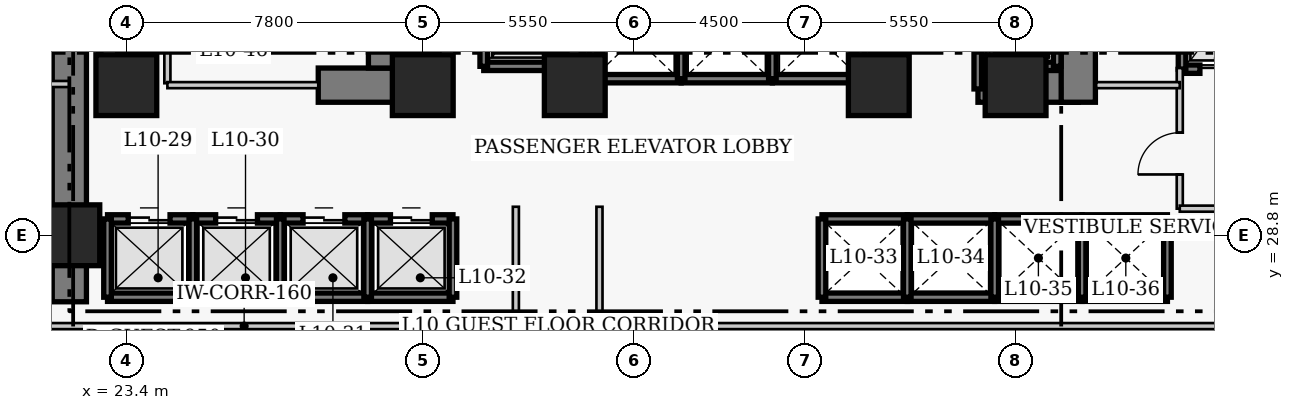
"""IFC4 building model, lengths in metres.
Left out: names, types, materials, properties, quantities, classifications, styles, units other than length and angle.
Written with IfcOpenShell. Run it as: python <this file> out.ifc"""

import sys

from ifc_helpers import new_model, si_unit, direction, frame, frame_2d, origin, origin_2d, place, context, subcontext, project, spatial, rectangle, extrude, element, fill, save


model = new_model("IFC4")
c1 = context("Model", 3, precision=1e-05, world=origin(), true_north=direction((0.0, 1.0)))
c2 = subcontext(c1, "Body", "Model", "MODEL_VIEW")
j1 = project(units=[si_unit("LENGTHUNIT", "METRE"), si_unit("PLANEANGLEUNIT", "RADIAN")], contexts=[c1])
p1 = place(None, origin())
s1 = spatial("IfcSite", under=j1, at=p1, CompositionType="ELEMENT")
p2 = place(p1, origin())
s2 = spatial("IfcBuilding", under=s1, at=p2, CompositionType="ELEMENT")
p3 = place(p2, frame((0.0, 0.0, 45.0)))
s3 = spatial("IfcBuildingStorey", under=s2, at=p3, CompositionType="ELEMENT", Elevation=45.0)
p4 = place(p3, frame((21.9, 27.05, 0.0), z_axis=(0.0, 0.0, 1.0), x_axis=(0.0, 1.0, 0.0)))
e1 = element("IfcWall", 1, at=p4, inside=s3, PredefinedType="SHEAR", context=c2, shape_type="SweptSolid", body=[
    extrude(rectangle(XDim=13.72, YDim=0.9, at=frame_2d((6.86, 0.0))), origin(), (0.0, 0.0, 1.0), 3.8),
])
p5 = place(p3, frame((28.45, 32.75, 0.0), z_axis=(0.0, 0.0, 1.0), x_axis=(1.0, 0.0, 0.0)))
e2 = element("IfcWall", 2, at=p5, inside=s3, PredefinedType="SHEAR", context=c2, shape_type="SweptSolid", body=[
    extrude(rectangle(XDim=2.4, YDim=0.9, at=frame_2d((1.2, 0.0))), origin(), (0.0, 0.0, 1.0), 3.8),
])
p6 = place(p3, frame((45.81, 32.75, 0.0), z_axis=(0.0, 0.0, 1.0), x_axis=(1.0, 0.0, 0.0)))
e3 = element("IfcWall", 3, at=p6, inside=s3, PredefinedType="SHEAR", context=c2, shape_type="SweptSolid", body=[
    extrude(rectangle(XDim=2.64, YDim=0.9, at=frame_2d((1.32, 0.0))), origin(), (0.0, 0.0, 1.0), 3.8),
])
p7 = place(p3, frame((30.22, 33.2, 0.0), z_axis=(0.0, 0.0, 1.0), x_axis=(0.0, 1.0, 0.0)))
e4 = element("IfcWall", 4, at=p7, inside=s3, PredefinedType="SHEAR", context=c2, shape_type="SweptSolid", body=[
    extrude(rectangle(XDim=7.12, YDim=0.9, at=frame_2d((3.56, 0.0))), origin(), (0.0, 0.0, 1.0), 3.8),
])
p8 = place(p3, frame((48.45, 32.3, 0.0), z_axis=(0.0, 0.0, 1.0), x_axis=(0.0, 1.0, 0.0)))
e5 = element("IfcWall", 5, at=p8, inside=s3, PredefinedType="SHEAR", context=c2, shape_type="SweptSolid", body=[
    extrude(rectangle(XDim=8.02, YDim=0.9, at=frame_2d((4.01, 0.0))), origin(), (0.0, 0.0, 1.0), 3.8),
])
p9 = place(p8, frame((5.9, 0.0, 0.0)))
e6 = element("IfcOpeningElement", 6, at=p9, cuts=e5, PredefinedType="OPENING", context=c2, shape_type="SweptSolid", body=[
    extrude(rectangle(XDim=1.1, YDim=2.15, at=frame_2d((0.55, 1.075))), frame((0.0, 0.46, 0.0), z_axis=(0.0, -1.0, 0.0), x_axis=(1.0, 0.0, 0.0)), (0.0, 0.0, 1.0), 0.92),
])
for number, where, z_axis, x_axis in (
    (7, (21.9, 28.8, 0.0), (0.0, 0.0, 1.0), (1.0, 0.0, 0.0)),
    (8, (23.4, 32.75, 0.0), (0.0, 0.0, 1.0), (1.0, 0.0, 0.0)),
    (9, (31.2, 32.75, 0.0), (0.0, 0.0, 1.0), (1.0, 0.0, 0.0)),
    (10, (35.2, 32.75, 0.0), (0.0, 0.0, 1.0), (1.0, 0.0, 0.0)),
    (11, (43.2, 32.75, 0.0), (0.0, 0.0, 1.0), (1.0, 0.0, 0.0)),
    (12, (46.8, 32.75, 0.0), (0.0, 0.0, 1.0), (1.0, 0.0, 0.0)),
):
    element("IfcColumn", number, at=place(p3, frame(where, z_axis=z_axis, x_axis=x_axis)), inside=s3, PredefinedType="COLUMN", context=c2, shape_type="SweptSolid", body=[
        extrude(rectangle(XDim=1.6, YDim=1.6, at=origin_2d()), origin(), (0.0, 0.0, 1.0), 3.8),
    ])
p10 = place(p3, frame((22.905, 29.23, 0.0), z_axis=(0.0, 0.0, 1.0), x_axis=(1.0, 0.0, 0.0)))
e13 = element("IfcWall", 13, at=p10, inside=s3, PredefinedType="SHEAR", context=c2, shape_type="SweptSolid", body=[
    extrude(rectangle(XDim=2.245, YDim=0.22, at=frame_2d((1.123, 0.0))), origin(), (0.0, 0.0, 1.0), 3.8),
])
p11 = place(p10, frame((0.545, 0.0, 0.0)))
e14 = element("IfcOpeningElement", 14, at=p11, cuts=e13, PredefinedType="OPENING", context=c2, shape_type="SweptSolid", body=[
    extrude(rectangle(XDim=1.1, YDim=2.15, at=frame_2d((0.55, 1.075))), frame((0.0, 0.12, 0.0), z_axis=(0.0, -1.0, 0.0), x_axis=(1.0, 0.0, 0.0)), (0.0, 0.0, 1.0), 0.24),
])
p12 = place(p3, frame((22.905, 27.17, 0.0), z_axis=(0.0, 0.0, 1.0), x_axis=(1.0, 0.0, 0.0)))
e15 = element("IfcWall", 15, at=p12, inside=s3, PredefinedType="SHEAR", context=c2, shape_type="SweptSolid", body=[
    extrude(rectangle(XDim=2.245, YDim=0.22, at=frame_2d((1.123, 0.0))), origin(), (0.0, 0.0, 1.0), 3.8),
])
p13 = place(p3, frame((22.905, 27.17, 0.0), z_axis=(0.0, 0.0, 1.0), x_axis=(0.0, 1.0, 0.0)))
e16 = element("IfcWall", 16, at=p13, inside=s3, PredefinedType="SHEAR", context=c2, shape_type="SweptSolid", body=[
    extrude(rectangle(XDim=2.06, YDim=0.2, at=frame_2d((1.03, 0.0))), origin(), (0.0, 0.0, 1.0), 3.8),
])
p14 = place(p3, frame((25.15, 29.23, 0.0), z_axis=(0.0, 0.0, 1.0), x_axis=(1.0, 0.0, 0.0)))
e17 = element("IfcWall", 17, at=p14, inside=s3, PredefinedType="SHEAR", context=c2, shape_type="SweptSolid", body=[
    extrude(rectangle(XDim=2.3, YDim=0.22, at=frame_2d((1.15, 0.0))), origin(), (0.0, 0.0, 1.0), 3.8),
])
p15 = place(p14, frame((0.6, 0.0, 0.0)))
e18 = element("IfcOpeningElement", 18, at=p15, cuts=e17, PredefinedType="OPENING", context=c2, shape_type="SweptSolid", body=[
    extrude(rectangle(XDim=1.1, YDim=2.15, at=frame_2d((0.55, 1.075))), frame((0.0, 0.12, 0.0), z_axis=(0.0, -1.0, 0.0), x_axis=(1.0, 0.0, 0.0)), (0.0, 0.0, 1.0), 0.24),
])
p16 = place(p3, frame((25.15, 27.17, 0.0), z_axis=(0.0, 0.0, 1.0), x_axis=(1.0, 0.0, 0.0)))
e19 = element("IfcWall", 19, at=p16, inside=s3, PredefinedType="SHEAR", context=c2, shape_type="SweptSolid", body=[
    extrude(rectangle(XDim=2.3, YDim=0.22, at=frame_2d((1.15, 0.0))), origin(), (0.0, 0.0, 1.0), 3.8),
])
p17 = place(p3, frame((25.15, 27.17, 0.0), z_axis=(0.0, 0.0, 1.0), x_axis=(0.0, 1.0, 0.0)))
e20 = element("IfcWall", 20, at=p17, inside=s3, PredefinedType="SHEAR", context=c2, shape_type="SweptSolid", body=[
    extrude(rectangle(XDim=2.06, YDim=0.2, at=frame_2d((1.03, 0.0))), origin(), (0.0, 0.0, 1.0), 3.8),
])
p18 = place(p3, frame((27.45, 29.23, 0.0), z_axis=(0.0, 0.0, 1.0), x_axis=(1.0, 0.0, 0.0)))
e21 = element("IfcWall", 21, at=p18, inside=s3, PredefinedType="SHEAR", context=c2, shape_type="SweptSolid", body=[
    extrude(rectangle(XDim=2.3, YDim=0.22, at=frame_2d((1.15, 0.0))), origin(), (0.0, 0.0, 1.0), 3.8),
])
p19 = place(p18, frame((0.6, 0.0, 0.0)))
e22 = element("IfcOpeningElement", 22, at=p19, cuts=e21, PredefinedType="OPENING", context=c2, shape_type="SweptSolid", body=[
    extrude(rectangle(XDim=1.1, YDim=2.15, at=frame_2d((0.55, 1.075))), frame((0.0, 0.12, 0.0), z_axis=(0.0, -1.0, 0.0), x_axis=(1.0, 0.0, 0.0)), (0.0, 0.0, 1.0), 0.24),
])
p20 = place(p3, frame((27.45, 27.17, 0.0), z_axis=(0.0, 0.0, 1.0), x_axis=(1.0, 0.0, 0.0)))
e23 = element("IfcWall", 23, at=p20, inside=s3, PredefinedType="SHEAR", context=c2, shape_type="SweptSolid", body=[
    extrude(rectangle(XDim=2.3, YDim=0.22, at=frame_2d((1.15, 0.0))), origin(), (0.0, 0.0, 1.0), 3.8),
])
p21 = place(p3, frame((27.45, 27.17, 0.0), z_axis=(0.0, 0.0, 1.0), x_axis=(0.0, 1.0, 0.0)))
e24 = element("IfcWall", 24, at=p21, inside=s3, PredefinedType="SHEAR", context=c2, shape_type="SweptSolid", body=[
    extrude(rectangle(XDim=2.06, YDim=0.2, at=frame_2d((1.03, 0.0))), origin(), (0.0, 0.0, 1.0), 3.8),
])
p22 = place(p3, frame((29.75, 29.23, 0.0), z_axis=(0.0, 0.0, 1.0), x_axis=(1.0, 0.0, 0.0)))
e25 = element("IfcWall", 25, at=p22, inside=s3, PredefinedType="SHEAR", context=c2, shape_type="SweptSolid", body=[
    extrude(rectangle(XDim=2.245, YDim=0.22, at=frame_2d((1.123, 0.0))), origin(), (0.0, 0.0, 1.0), 3.8),
])
p23 = place(p22, frame((0.6, 0.0, 0.0)))
e26 = element("IfcOpeningElement", 26, at=p23, cuts=e25, PredefinedType="OPENING", context=c2, shape_type="SweptSolid", body=[
    extrude(rectangle(XDim=1.1, YDim=2.15, at=frame_2d((0.55, 1.075))), frame((0.0, 0.12, 0.0), z_axis=(0.0, -1.0, 0.0), x_axis=(1.0, 0.0, 0.0)), (0.0, 0.0, 1.0), 0.24),
])
p24 = place(p3, frame((29.75, 27.17, 0.0), z_axis=(0.0, 0.0, 1.0), x_axis=(1.0, 0.0, 0.0)))
e27 = element("IfcWall", 27, at=p24, inside=s3, PredefinedType="SHEAR", context=c2, shape_type="SweptSolid", body=[
    extrude(rectangle(XDim=2.245, YDim=0.22, at=frame_2d((1.123, 0.0))), origin(), (0.0, 0.0, 1.0), 3.8),
])
for number, where, z_axis, x_axis in (
    (28, (29.75, 27.17, 0.0), (0.0, 0.0, 1.0), (0.0, 1.0, 0.0)),
    (29, (31.995, 27.17, 0.0), (0.0, 0.0, 1.0), (0.0, 1.0, 0.0)),
):
    element("IfcWall", number, at=place(p3, frame(where, z_axis=z_axis, x_axis=x_axis)), inside=s3, PredefinedType="SHEAR", context=c2, shape_type="SweptSolid", body=[
        extrude(rectangle(XDim=2.06, YDim=0.2, at=frame_2d((1.03, 0.0))), origin(), (0.0, 0.0, 1.0), 3.8),
    ])
for number, where, z_axis, x_axis in (
    (30, (41.705, 29.23, 0.0), (0.0, 0.0, 1.0), (1.0, 0.0, 0.0)),
    (31, (41.705, 27.17, 0.0), (0.0, 0.0, 1.0), (1.0, 0.0, 0.0)),
):
    element("IfcWall", number, at=place(p3, frame(where, z_axis=z_axis, x_axis=x_axis)), inside=s3, PredefinedType="SHEAR", context=c2, shape_type="SweptSolid", body=[
        extrude(rectangle(XDim=2.245, YDim=0.22, at=frame_2d((1.123, 0.0))), origin(), (0.0, 0.0, 1.0), 3.8),
    ])
p25 = place(p3, frame((41.705, 27.17, 0.0), z_axis=(0.0, 0.0, 1.0), x_axis=(0.0, 1.0, 0.0)))
e32 = element("IfcWall", 32, at=p25, inside=s3, PredefinedType="SHEAR", context=c2, shape_type="SweptSolid", body=[
    extrude(rectangle(XDim=2.06, YDim=0.2, at=frame_2d((1.03, 0.0))), origin(), (0.0, 0.0, 1.0), 3.8),
])
for number, where, z_axis, x_axis in (
    (33, (43.95, 29.23, 0.0), (0.0, 0.0, 1.0), (1.0, 0.0, 0.0)),
    (34, (43.95, 27.17, 0.0), (0.0, 0.0, 1.0), (1.0, 0.0, 0.0)),
):
    element("IfcWall", number, at=place(p3, frame(where, z_axis=z_axis, x_axis=x_axis)), inside=s3, PredefinedType="SHEAR", context=c2, shape_type="SweptSolid", body=[
        extrude(rectangle(XDim=2.3, YDim=0.22, at=frame_2d((1.15, 0.0))), origin(), (0.0, 0.0, 1.0), 3.8),
    ])
p26 = place(p3, frame((43.95, 27.17, 0.0), z_axis=(0.0, 0.0, 1.0), x_axis=(0.0, 1.0, 0.0)))
e35 = element("IfcWall", 35, at=p26, inside=s3, PredefinedType="SHEAR", context=c2, shape_type="SweptSolid", body=[
    extrude(rectangle(XDim=2.06, YDim=0.2, at=frame_2d((1.03, 0.0))), origin(), (0.0, 0.0, 1.0), 3.8),
])
for number, where, z_axis, x_axis in (
    (36, (46.25, 29.23, 0.0), (0.0, 0.0, 1.0), (1.0, 0.0, 0.0)),
    (37, (46.25, 27.17, 0.0), (0.0, 0.0, 1.0), (1.0, 0.0, 0.0)),
):
    element("IfcWall", number, at=place(p3, frame(where, z_axis=z_axis, x_axis=x_axis)), inside=s3, PredefinedType="SHEAR", context=c2, shape_type="SweptSolid", body=[
        extrude(rectangle(XDim=2.3, YDim=0.22, at=frame_2d((1.15, 0.0))), origin(), (0.0, 0.0, 1.0), 3.8),
    ])
p27 = place(p3, frame((46.25, 27.17, 0.0), z_axis=(0.0, 0.0, 1.0), x_axis=(0.0, 1.0, 0.0)))
e38 = element("IfcWall", 38, at=p27, inside=s3, PredefinedType="SHEAR", context=c2, shape_type="SweptSolid", body=[
    extrude(rectangle(XDim=2.06, YDim=0.2, at=frame_2d((1.03, 0.0))), origin(), (0.0, 0.0, 1.0), 3.8),
])
for number, where, z_axis, x_axis in (
    (39, (48.55, 29.23, 0.0), (0.0, 0.0, 1.0), (1.0, 0.0, 0.0)),
    (40, (48.55, 27.17, 0.0), (0.0, 0.0, 1.0), (1.0, 0.0, 0.0)),
):
    element("IfcWall", number, at=place(p3, frame(where, z_axis=z_axis, x_axis=x_axis)), inside=s3, PredefinedType="SHEAR", context=c2, shape_type="SweptSolid", body=[
        extrude(rectangle(XDim=2.245, YDim=0.22, at=frame_2d((1.123, 0.0))), origin(), (0.0, 0.0, 1.0), 3.8),
    ])
for number, where, z_axis, x_axis in (
    (41, (48.55, 27.17, 0.0), (0.0, 0.0, 1.0), (0.0, 1.0, 0.0)),
    (42, (50.795, 27.17, 0.0), (0.0, 0.0, 1.0), (0.0, 1.0, 0.0)),
):
    element("IfcWall", number, at=place(p3, frame(where, z_axis=z_axis, x_axis=x_axis)), inside=s3, PredefinedType="SHEAR", context=c2, shape_type="SweptSolid", body=[
        extrude(rectangle(XDim=2.06, YDim=0.2, at=frame_2d((1.03, 0.0))), origin(), (0.0, 0.0, 1.0), 3.8),
    ])
p28 = place(p3, frame((35.68, 32.92, 0.0), z_axis=(0.0, 0.0, 1.0), x_axis=(1.0, 0.0, 0.0)))
e43 = element("IfcWall", 43, at=p28, inside=s3, PredefinedType="SHEAR", context=c2, shape_type="SweptSolid", body=[
    extrude(rectangle(XDim=2.32, YDim=0.22, at=frame_2d((1.16, 0.0))), origin(), (0.0, 0.0, 1.0), 3.8),
])
p29 = place(p3, frame((35.68, 32.92, 0.0), z_axis=(0.0, 0.0, 1.0), x_axis=(0.0, 1.0, 0.0)))
e44 = element("IfcWall", 44, at=p29, inside=s3, PredefinedType="SHEAR", context=c2, shape_type="SweptSolid", body=[
    extrude(rectangle(XDim=2.16, YDim=0.2, at=frame_2d((1.08, 0.0))), origin(), (0.0, 0.0, 1.0), 3.8),
])
p30 = place(p3, frame((38.0, 32.92, 0.0), z_axis=(0.0, 0.0, 1.0), x_axis=(1.0, 0.0, 0.0)))
e45 = element("IfcWall", 45, at=p30, inside=s3, PredefinedType="SHEAR", context=c2, shape_type="SweptSolid", body=[
    extrude(rectangle(XDim=2.4, YDim=0.22, at=frame_2d((1.2, 0.0))), origin(), (0.0, 0.0, 1.0), 3.8),
])
p31 = place(p3, frame((38.0, 32.92, 0.0), z_axis=(0.0, 0.0, 1.0), x_axis=(0.0, 1.0, 0.0)))
e46 = element("IfcWall", 46, at=p31, inside=s3, PredefinedType="SHEAR", context=c2, shape_type="SweptSolid", body=[
    extrude(rectangle(XDim=2.16, YDim=0.2, at=frame_2d((1.08, 0.0))), origin(), (0.0, 0.0, 1.0), 3.8),
])
p32 = place(p3, frame((40.4, 32.92, 0.0), z_axis=(0.0, 0.0, 1.0), x_axis=(1.0, 0.0, 0.0)))
e47 = element("IfcWall", 47, at=p32, inside=s3, PredefinedType="SHEAR", context=c2, shape_type="SweptSolid", body=[
    extrude(rectangle(XDim=2.32, YDim=0.22, at=frame_2d((1.16, 0.0))), origin(), (0.0, 0.0, 1.0), 3.8),
])
for number, where, z_axis, x_axis in (
    (48, (40.4, 32.92, 0.0), (0.0, 0.0, 1.0), (0.0, 1.0, 0.0)),
    (49, (42.72, 32.92, 0.0), (0.0, 0.0, 1.0), (0.0, 1.0, 0.0)),
):
    element("IfcWall", number, at=place(p3, frame(where, z_axis=z_axis, x_axis=x_axis)), inside=s3, PredefinedType="SHEAR", context=c2, shape_type="SweptSolid", body=[
        extrude(rectangle(XDim=2.16, YDim=0.2, at=frame_2d((1.08, 0.0))), origin(), (0.0, 0.0, 1.0), 3.8),
    ])
p33 = place(p3, frame((51.18, 33.17, 0.0), z_axis=(0.0, 0.0, 1.0), x_axis=(1.0, 0.0, 0.0)))
e50 = element("IfcWall", 50, at=p33, inside=s3, PredefinedType="SHEAR", context=c2, shape_type="SweptSolid", body=[
    extrude(rectangle(XDim=2.42, YDim=0.22, at=frame_2d((1.21, 0.0))), origin(), (0.0, 0.0, 1.0), 3.8),
])
p34 = place(p33, frame((0.47, 0.0, 0.0)))
e51 = element("IfcOpeningElement", 51, at=p34, cuts=e50, PredefinedType="OPENING", context=c2, shape_type="SweptSolid", body=[
    extrude(rectangle(XDim=1.3, YDim=2.15, at=frame_2d((0.65, 1.075))), frame((0.0, 0.12, 0.0), z_axis=(0.0, -1.0, 0.0), x_axis=(1.0, 0.0, 0.0)), (0.0, 0.0, 1.0), 0.24),
])
p35 = place(p3, frame((51.18, 33.17, 0.0), z_axis=(0.0, 0.0, 1.0), x_axis=(0.0, 1.0, 0.0)))
e52 = element("IfcWall", 52, at=p35, inside=s3, PredefinedType="SHEAR", context=c2, shape_type="SweptSolid", body=[
    extrude(rectangle(XDim=2.86, YDim=0.2, at=frame_2d((1.43, 0.0))), origin(), (0.0, 0.0, 1.0), 3.8),
])
p36 = place(p3, frame((32.805, 33.245, 0.0), z_axis=(0.0, 0.0, 1.0), x_axis=(1.0, 0.0, 0.0)))
e53 = element("IfcWall", 53, at=p36, inside=s3, PredefinedType="SHEAR", context=c2, shape_type="SweptSolid", body=[
    extrude(rectangle(XDim=2.09, YDim=0.22, at=frame_2d((1.045, 0.0))), origin(), (0.0, 0.0, 1.0), 3.8),
])
for number, where, z_axis, x_axis in (
    (54, (32.805, 33.245, 0.0), (0.0, 0.0, 1.0), (0.0, 1.0, 0.0)),
    (55, (34.895, 33.245, 0.0), (0.0, 0.0, 1.0), (0.0, 1.0, 0.0)),
):
    element("IfcWall", number, at=place(p3, frame(where, z_axis=z_axis, x_axis=x_axis)), inside=s3, PredefinedType="SHEAR", context=c2, shape_type="SweptSolid", body=[
        extrude(rectangle(XDim=2.91, YDim=0.2, at=frame_2d((1.455, 0.0))), origin(), (0.0, 0.0, 1.0), 3.8),
    ])
p37 = place(p3, frame((45.805, 33.245, 0.0), z_axis=(0.0, 0.0, 1.0), x_axis=(1.0, 0.0, 0.0)))
e56 = element("IfcWall", 56, at=p37, inside=s3, PredefinedType="SHEAR", context=c2, shape_type="SweptSolid", body=[
    extrude(rectangle(XDim=2.09, YDim=0.22, at=frame_2d((1.045, 0.0))), origin(), (0.0, 0.0, 1.0), 3.8),
])
p38 = place(p3, frame((45.805, 32.65, 0.0), z_axis=(0.0, 0.0, 1.0), x_axis=(0.0, 1.0, 0.0)))
e57 = element("IfcWall", 57, at=p38, inside=s3, PredefinedType="SHEAR", context=c2, shape_type="SweptSolid", body=[
    extrude(rectangle(XDim=3.505, YDim=0.2, at=frame_2d((1.752, 0.0))), origin(), (0.0, 0.0, 1.0), 3.8),
])
p39 = place(p3, frame((47.895, 33.245, 0.0), z_axis=(0.0, 0.0, 1.0), x_axis=(0.0, 1.0, 0.0)))
e58 = element("IfcWall", 58, at=p39, inside=s3, PredefinedType="SHEAR", context=c2, shape_type="SweptSolid", body=[
    extrude(rectangle(XDim=2.91, YDim=0.2, at=frame_2d((1.455, 0.0))), origin(), (0.0, 0.0, 1.0), 3.8),
])
p40 = place(p3, frame((24.48, 32.8, 0.0), z_axis=(0.0, 0.0, 1.0), x_axis=(0.0, 1.0, 0.0)))
e59 = element("IfcWall", 59, at=p40, inside=s3, PredefinedType="PARTITIONING", context=c2, shape_type="SweptSolid", body=[
    extrude(rectangle(XDim=3.57, YDim=0.16, at=frame_2d((1.785, 0.0))), origin(), (0.0, 0.0, 1.0), 3.54),
])
p41 = place(p40, frame((1.604, 0.0, 0.0)))
e60 = element("IfcOpeningElement", 60, at=p41, cuts=e59, PredefinedType="OPENING", context=c2, shape_type="SweptSolid", body=[
    extrude(rectangle(XDim=0.9, YDim=2.1, at=frame_2d((0.45, 1.05))), frame((0.0, 0.09, 0.0), z_axis=(0.0, -1.0, 0.0), x_axis=(1.0, 0.0, 0.0)), (0.0, 0.0, 1.0), 0.18),
])
p42 = place(p3, frame((51.12, 29.5, 0.0), z_axis=(0.0, 0.0, 1.0), x_axis=(0.0, 1.0, 0.0)))
e61 = element("IfcWall", 61, at=p42, inside=s3, PredefinedType="PARTITIONING", context=c2, shape_type="SweptSolid", body=[
    extrude(rectangle(XDim=3.7, YDim=0.16, at=frame_2d((1.85, 0.0))), origin(), (0.0, 0.0, 1.0), 3.54),
])
p43 = place(p42, frame((0.9, 0.0, 0.0)))
e62 = element("IfcOpeningElement", 62, at=p43, cuts=e61, PredefinedType="OPENING", context=c2, shape_type="SweptSolid", body=[
    extrude(rectangle(XDim=1.1, YDim=2.15, at=frame_2d((0.55, 1.075))), frame((0.0, 0.09, 0.0), z_axis=(0.0, -1.0, 0.0), x_axis=(1.0, 0.0, 0.0)), (0.0, 0.0, 1.0), 0.18),
])
p44 = place(p3, frame((51.12, 29.5, 0.0), z_axis=(0.0, 0.0, 1.0), x_axis=(1.0, 0.0, 0.0)))
e63 = element("IfcWall", 63, at=p44, inside=s3, PredefinedType="PARTITIONING", context=c2, shape_type="SweptSolid", body=[
    extrude(rectangle(XDim=5.63, YDim=0.16, at=frame_2d((2.815, 0.0))), origin(), (0.0, 0.0, 1.0), 3.54),
])
p45 = place(p3, frame((24.48, 32.75, 0.0), z_axis=(0.0, 0.0, 1.0), x_axis=(1.0, 0.0, 0.0)))
e64 = element("IfcWall", 64, at=p45, inside=s3, PredefinedType="PARTITIONING", context=c2, shape_type="SweptSolid", body=[
    extrude(rectangle(XDim=3.97, YDim=0.16, at=frame_2d((1.985, 0.0))), origin(), (0.0, 0.0, 1.0), 3.54),
])
p46 = place(p3, frame((48.92, 32.75, 0.0), z_axis=(0.0, 0.0, 1.0), x_axis=(1.0, 0.0, 0.0)))
e65 = element("IfcWall", 65, at=p46, inside=s3, PredefinedType="PARTITIONING", context=c2, shape_type="SweptSolid", body=[
    extrude(rectangle(XDim=2.2, YDim=0.16, at=frame_2d((1.1, 0.0))), origin(), (0.0, 0.0, 1.0), 3.54),
])
p47 = place(p3, frame((19.35, 26.41, 0.0), z_axis=(0.0, 0.0, 1.0), x_axis=(1.0, 0.0, 0.0)))
e66 = element("IfcWall", 66, at=p47, inside=s3, PredefinedType="PARTITIONING", context=c2, shape_type="SweptSolid", body=[
    extrude(rectangle(XDim=14.3, YDim=0.16, at=frame_2d((7.15, 0.0))), origin(), (0.0, 0.0, 1.0), 3.54),
])
p48 = place(p3, frame((35.85, 26.41, 0.0), z_axis=(0.0, 0.0, 1.0), x_axis=(1.0, 0.0, 0.0)))
e67 = element("IfcWall", 67, at=p48, inside=s3, PredefinedType="PARTITIONING", context=c2, shape_type="SweptSolid", body=[
    extrude(rectangle(XDim=22.8, YDim=0.16, at=frame_2d((11.4, 0.0))), origin(), (0.0, 0.0, 1.0), 3.54),
])
for number, where, z_axis, x_axis in (
    (68, (33.65, 26.41, 0.0), (0.0, 0.0, 1.0), (0.0, 1.0, 0.0)),
    (69, (35.85, 26.41, 0.0), (0.0, 0.0, 1.0), (0.0, 1.0, 0.0)),
):
    element("IfcWall", number, at=place(p3, frame(where, z_axis=z_axis, x_axis=x_axis)), inside=s3, PredefinedType="PARTITIONING", context=c2, shape_type="SweptSolid", body=[
        extrude(rectangle(XDim=3.14, YDim=0.16, at=frame_2d((1.57, 0.0))), origin(), (0.0, 0.0, 1.0), 3.54),
    ])
p49 = place(p3, frame((19.41, 32.78, 0.0), z_axis=(0.0, 0.0, 1.0), x_axis=(1.0, 0.0, 0.0)))
e70 = element("IfcWall", 70, at=p49, inside=s3, PredefinedType="PARTITIONING", context=c2, shape_type="SweptSolid", body=[
    extrude(rectangle(XDim=2.49, YDim=0.16, at=frame_2d((1.245, 0.0))), origin(), (0.0, 0.0, 1.0), 3.54),
])
p50 = place(p11, origin())
e71 = element("IfcDoor", 71, at=p50, inside=s3, OperationType="DOUBLE_DOOR_SLIDING", PredefinedType="DOOR", context=c2, shape_type="SweptSolid", body=[
    extrude(rectangle(XDim=1.1, YDim=2.15, at=frame_2d((0.55, 1.075))), frame((0.0, 0.025, 0.0), z_axis=(0.0, -1.0, 0.0), x_axis=(1.0, 0.0, 0.0)), (0.0, 0.0, 1.0), 0.05),
])
fill(e14, e71)
p51 = place(p15, origin())
e72 = element("IfcDoor", 72, at=p51, inside=s3, OperationType="DOUBLE_DOOR_SLIDING", PredefinedType="DOOR", context=c2, shape_type="SweptSolid", body=[
    extrude(rectangle(XDim=1.1, YDim=2.15, at=frame_2d((0.55, 1.075))), frame((0.0, 0.025, 0.0), z_axis=(0.0, -1.0, 0.0), x_axis=(1.0, 0.0, 0.0)), (0.0, 0.0, 1.0), 0.05),
])
fill(e18, e72)
p52 = place(p19, origin())
e73 = element("IfcDoor", 73, at=p52, inside=s3, OperationType="DOUBLE_DOOR_SLIDING", PredefinedType="DOOR", context=c2, shape_type="SweptSolid", body=[
    extrude(rectangle(XDim=1.1, YDim=2.15, at=frame_2d((0.55, 1.075))), frame((0.0, 0.025, 0.0), z_axis=(0.0, -1.0, 0.0), x_axis=(1.0, 0.0, 0.0)), (0.0, 0.0, 1.0), 0.05),
])
fill(e22, e73)
p53 = place(p23, origin())
e74 = element("IfcDoor", 74, at=p53, inside=s3, OperationType="DOUBLE_DOOR_SLIDING", PredefinedType="DOOR", context=c2, shape_type="SweptSolid", body=[
    extrude(rectangle(XDim=1.1, YDim=2.15, at=frame_2d((0.55, 1.075))), frame((0.0, 0.025, 0.0), z_axis=(0.0, -1.0, 0.0), x_axis=(1.0, 0.0, 0.0)), (0.0, 0.0, 1.0), 0.05),
])
fill(e26, e74)
p54 = place(p34, origin())
e75 = element("IfcDoor", 75, at=p54, inside=s3, OperationType="DOUBLE_DOOR_SLIDING", PredefinedType="DOOR", context=c2, shape_type="SweptSolid", body=[
    extrude(rectangle(XDim=1.3, YDim=2.15, at=frame_2d((0.65, 1.075))), frame((0.0, 0.025, 0.0), z_axis=(0.0, -1.0, 0.0), x_axis=(1.0, 0.0, 0.0)), (0.0, 0.0, 1.0), 0.05),
])
fill(e51, e75)
p55 = place(p43, origin())
e76 = element("IfcDoor", 76, at=p55, inside=s3, OperationType="SINGLE_SWING_LEFT", PredefinedType="DOOR", context=c2, shape_type="SweptSolid", body=[
    extrude(rectangle(XDim=1.1, YDim=2.15, at=frame_2d((0.55, 1.075))), frame((0.0, 0.025, 0.0), z_axis=(0.0, -1.0, 0.0), x_axis=(1.0, 0.0, 0.0)), (0.0, 0.0, 1.0), 0.05),
])
fill(e62, e76)
save(model, sys.argv[1])
